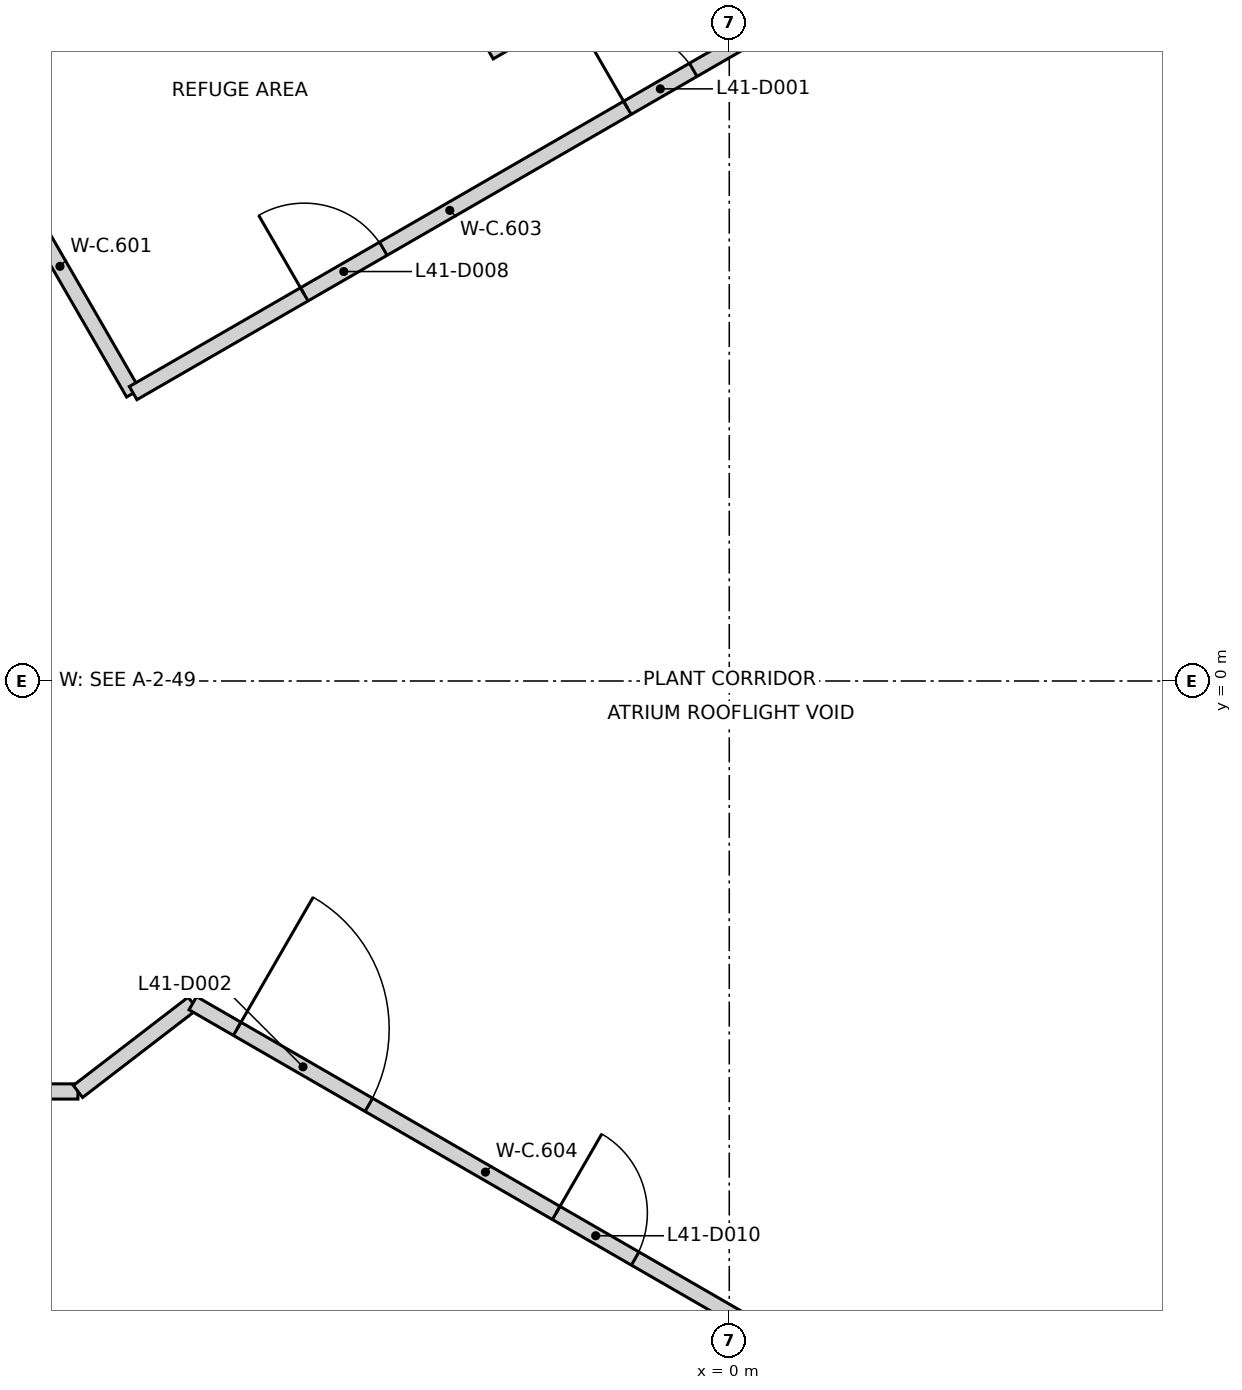
"""IFC4 building model, lengths in metres.
Left out: names, types, materials, properties, quantities, classifications, styles, units other than length and angle.
Written with IfcOpenShell. Run it as: python <this file> out.ifc"""

import sys

from ifc_helpers import new_model, si_unit, direction, frame, frame_2d, origin, origin_2d, place, context, subcontext, project, spatial, rectangle, extrude, element, fill, save


model = new_model("IFC4")
c1 = context("Model", 3, precision=1e-05, world=origin(), true_north=direction((0.0, 1.0)))
c2 = subcontext(c1, "Body", "Model", "MODEL_VIEW")
j1 = project(units=[si_unit("LENGTHUNIT", "METRE"), si_unit("PLANEANGLEUNIT", "RADIAN")], contexts=[c1])
p1 = place(None, origin())
s1 = spatial("IfcSite", under=j1, at=p1, CompositionType="ELEMENT")
p2 = place(p1, origin())
s2 = spatial("IfcBuilding", under=s1, at=p2, CompositionType="ELEMENT")
p3 = place(p2, frame((0.0, 0.0, 164.8)))
s3 = spatial("IfcBuildingStorey", under=s2, at=p3, CompositionType="ELEMENT", Elevation=164.8)
p4 = place(p3, frame((10.42, 6.498, 0.0), z_axis=(0.0, 0.0, 1.0), x_axis=(-0.866021906294, 0.500006057782, 0.0)))
e1 = element("IfcWall", 1, at=p4, inside=s3, PredefinedType="SHEAR", context=c2, shape_type="SweptSolid", body=[
    extrude(rectangle(XDim=11.55, YDim=0.25, at=frame_2d((5.775, 0.0))), origin(), (0.0, 0.0, 1.0), 4.45),
])
p5 = place(p4, frame((10.025, 0.0, 0.0)))
e2 = element("IfcOpeningElement", 2, at=p5, cuts=e1, PredefinedType="OPENING", context=c2, shape_type="SweptSolid", body=[
    extrude(rectangle(XDim=1.2, YDim=2.1, at=frame_2d((0.6, 1.05))), frame((0.0, 0.135, 0.0), z_axis=(0.0, -1.0, 0.0), x_axis=(1.0, 0.0, 0.0)), (0.0, 0.0, 1.0), 0.27),
])
p6 = place(p4, frame((8.725, 0.0, 0.0)))
e3 = element("IfcOpeningElement", 3, at=p6, cuts=e1, PredefinedType="OPENING", context=c2, shape_type="SweptSolid", body=[
    extrude(rectangle(XDim=1.2, YDim=2.1, at=frame_2d((0.6, 1.05))), frame((0.0, 0.135, 0.0), z_axis=(0.0, -1.0, 0.0), x_axis=(1.0, 0.0, 0.0)), (0.0, 0.0, 1.0), 0.27),
])
p7 = place(p3, frame((0.417, -12.273, 0.0), z_axis=(0.0, 0.0, 1.0), x_axis=(0.866021906294, 0.500006057782, 0.0)))
e4 = element("IfcWall", 4, at=p7, inside=s3, PredefinedType="SHEAR", context=c2, shape_type="SweptSolid", body=[
    extrude(rectangle(XDim=11.55, YDim=0.25, at=frame_2d((5.775, 0.0))), origin(), (0.0, 0.0, 1.0), 4.45),
])
p8 = place(p7, frame((10.025, 0.0, 0.0)))
e5 = element("IfcOpeningElement", 5, at=p8, cuts=e4, PredefinedType="OPENING", context=c2, shape_type="SweptSolid", body=[
    extrude(rectangle(XDim=1.2, YDim=2.1, at=frame_2d((0.6, 1.05))), frame((0.0, 0.135, 0.0), z_axis=(0.0, -1.0, 0.0), x_axis=(1.0, 0.0, 0.0)), (0.0, 0.0, 1.0), 0.27),
])
p9 = place(p7, frame((8.725, 0.0, 0.0)))
e6 = element("IfcOpeningElement", 6, at=p9, cuts=e4, PredefinedType="OPENING", context=c2, shape_type="SweptSolid", body=[
    extrude(rectangle(XDim=1.2, YDim=2.1, at=frame_2d((0.6, 1.05))), frame((0.0, 0.135, 0.0), z_axis=(0.0, -1.0, 0.0), x_axis=(1.0, 0.0, 0.0)), (0.0, 0.0, 1.0), 0.27),
])
p10 = place(p3, frame((-10.652, -5.4, 0.0), z_axis=(0.0, 0.0, 1.0), x_axis=(1.0, 0.0, 0.0)))
e7 = element("IfcWall", 7, at=p10, inside=s3, PredefinedType="PARTITIONING", context=c2, shape_type="SweptSolid", body=[
    extrude(rectangle(XDim=2.083, YDim=0.2, at=frame_2d((1.042, 0.0))), origin(), (0.0, 0.0, 1.0), 4.45),
])
p11 = place(p3, frame((-9.769, 7.125, 0.0), z_axis=(0.0, 0.0, 1.0), x_axis=(0.499837575736, -0.866119159171, 0.0)))
e8 = element("IfcWall", 8, at=p11, inside=s3, PredefinedType="PARTITIONING", context=c2, shape_type="SweptSolid", body=[
    extrude(rectangle(XDim=3.855, YDim=0.2, at=frame_2d((1.928, 0.0))), origin(), (0.0, 0.0, 1.0), 4.45),
])
p12 = place(p3, frame((-8.569, -5.4, 0.0), z_axis=(0.0, 0.0, 1.0), x_axis=(0.792981085858, 0.609246253555, 0.0)))
e9 = element("IfcWall", 9, at=p12, inside=s3, PredefinedType="PARTITIONING", context=c2, shape_type="SweptSolid", body=[
    extrude(rectangle(XDim=1.906, YDim=0.2, at=frame_2d((0.953, 0.0))), origin(), (0.0, 0.0, 1.0), 4.45),
])
p13 = place(p3, frame((-7.843, 3.787, 0.0), z_axis=(0.0, 0.0, 1.0), x_axis=(0.866104875001, 0.499862326546, 0.0)))
e10 = element("IfcWall", 10, at=p13, inside=s3, PredefinedType="PARTITIONING", context=c2, shape_type="SweptSolid", body=[
    extrude(rectangle(XDim=9.62, YDim=0.2, at=frame_2d((4.81, 0.0))), origin(), (0.0, 0.0, 1.0), 4.45),
])
p14 = place(p13, frame((7.508, 0.0, 0.0)))
e11 = element("IfcOpeningElement", 11, at=p14, cuts=e10, PredefinedType="OPENING", context=c2, shape_type="SweptSolid", body=[
    extrude(rectangle(XDim=1.0, YDim=2.1, at=frame_2d((0.5, 1.05))), frame((0.0, 0.11, 0.0), z_axis=(0.0, -1.0, 0.0), x_axis=(1.0, 0.0, 0.0)), (0.0, 0.0, 1.0), 0.22),
])
p15 = place(p13, frame((2.6, 0.0, 0.0)))
e12 = element("IfcOpeningElement", 12, at=p15, cuts=e10, PredefinedType="OPENING", context=c2, shape_type="SweptSolid", body=[
    extrude(rectangle(XDim=1.2, YDim=2.1, at=frame_2d((0.6, 1.05))), frame((0.0, 0.11, 0.0), z_axis=(0.0, -1.0, 0.0), x_axis=(1.0, 0.0, 0.0)), (0.0, 0.0, 1.0), 0.22),
])
p16 = place(p3, frame((-7.058, -4.239, 0.0), z_axis=(0.0, 0.0, 1.0), x_axis=(0.86609917177, -0.499872208329, 0.0)))
e13 = element("IfcWall", 13, at=p16, inside=s3, PredefinedType="PARTITIONING", context=c2, shape_type="SweptSolid", body=[
    extrude(rectangle(XDim=8.891, YDim=0.2, at=frame_2d((4.445, 0.0))), origin(), (0.0, 0.0, 1.0), 4.45),
])
p17 = place(p16, frame((0.674, 0.0, 0.0)))
e14 = element("IfcOpeningElement", 14, at=p17, cuts=e13, PredefinedType="OPENING", context=c2, shape_type="SweptSolid", body=[
    extrude(rectangle(XDim=2.0, YDim=2.1, at=frame_2d((1.0, 1.05))), frame((0.0, 0.11, 0.0), z_axis=(0.0, -1.0, 0.0), x_axis=(1.0, 0.0, 0.0)), (0.0, 0.0, 1.0), 0.22),
])
p18 = place(p16, frame((5.52, 0.0, 0.0)))
e15 = element("IfcOpeningElement", 15, at=p18, cuts=e13, PredefinedType="OPENING", context=c2, shape_type="SweptSolid", body=[
    extrude(rectangle(XDim=1.2, YDim=2.1, at=frame_2d((0.6, 1.05))), frame((0.0, 0.11, 0.0), z_axis=(0.0, -1.0, 0.0), x_axis=(1.0, 0.0, 0.0)), (0.0, 0.0, 1.0), 0.22),
])
p19 = place(p3, frame((-5.038, 11.728, 0.0), z_axis=(0.0, 0.0, 1.0), x_axis=(0.500315898403, -0.86584294292, 0.0)))
e16 = element("IfcWall", 16, at=p19, inside=s3, PredefinedType="PARTITIONING", context=c2, shape_type="SweptSolid", body=[
    extrude(rectangle(XDim=4.036, YDim=0.2, at=frame_2d((2.018, 0.0))), origin(), (0.0, 0.0, 1.0), 4.45),
])
p20 = place(p3, frame((0.0, 0.0, -0.4)))
p21 = place(p20, origin())
p22 = place(p21, frame((0.0, 0.0, 0.35)))
e17 = element("IfcWindow", 17, at=p22, inside=s3, PartitioningType="SINGLE_PANEL", PredefinedType="SKYLIGHT", context=c2, shape_type="SweptSolid", body=[
    extrude(rectangle(XDim=8.34, YDim=5.2, at=origin_2d()), origin(), (0.0, 0.0, 1.0), 0.05),
])
p23 = place(p14, origin())
e18 = element("IfcDoor", 18, at=p23, inside=s3, OperationType="SINGLE_SWING_LEFT", PredefinedType="DOOR", context=c2, shape_type="SweptSolid", body=[
    extrude(rectangle(XDim=1.0, YDim=2.1, at=frame_2d((0.5, 1.05))), frame((0.0, 0.025, 0.0), z_axis=(0.0, -1.0, 0.0), x_axis=(1.0, 0.0, 0.0)), (0.0, 0.0, 1.0), 0.05),
])
fill(e11, e18)
p24 = place(p17, frame((2.0, 0.0, 0.0), z_axis=(0.0, 0.0, 1.0), x_axis=(-1.0, 0.0, 0.0)))
e19 = element("IfcDoor", 19, at=p24, inside=s3, OperationType="DOUBLE_DOOR_SINGLE_SWING", PredefinedType="DOOR", context=c2, shape_type="SweptSolid", body=[
    extrude(rectangle(XDim=2.0, YDim=2.1, at=frame_2d((1.0, 1.05))), frame((0.0, 0.025, 0.0), z_axis=(0.0, -1.0, 0.0), x_axis=(1.0, 0.0, 0.0)), (0.0, 0.0, 1.0), 0.05),
])
fill(e14, e19)
p25 = place(p15, origin())
e20 = element("IfcDoor", 20, at=p25, inside=s3, OperationType="SINGLE_SWING_LEFT", PredefinedType="DOOR", context=c2, shape_type="SweptSolid", body=[
    extrude(rectangle(XDim=1.2, YDim=2.1, at=frame_2d((0.6, 1.05))), frame((0.0, 0.025, 0.0), z_axis=(0.0, -1.0, 0.0), x_axis=(1.0, 0.0, 0.0)), (0.0, 0.0, 1.0), 0.05),
])
fill(e12, e20)
p26 = place(p18, frame((1.2, 0.0, 0.0), z_axis=(0.0, 0.0, 1.0), x_axis=(-1.0, 0.0, 0.0)))
e21 = element("IfcDoor", 21, at=p26, inside=s3, OperationType="SINGLE_SWING_LEFT", PredefinedType="DOOR", context=c2, shape_type="SweptSolid", body=[
    extrude(rectangle(XDim=1.2, YDim=2.1, at=frame_2d((0.6, 1.05))), frame((0.0, 0.025, 0.0), z_axis=(0.0, -1.0, 0.0), x_axis=(1.0, 0.0, 0.0)), (0.0, 0.0, 1.0), 0.05),
])
fill(e15, e21)
save(model, sys.argv[1])
